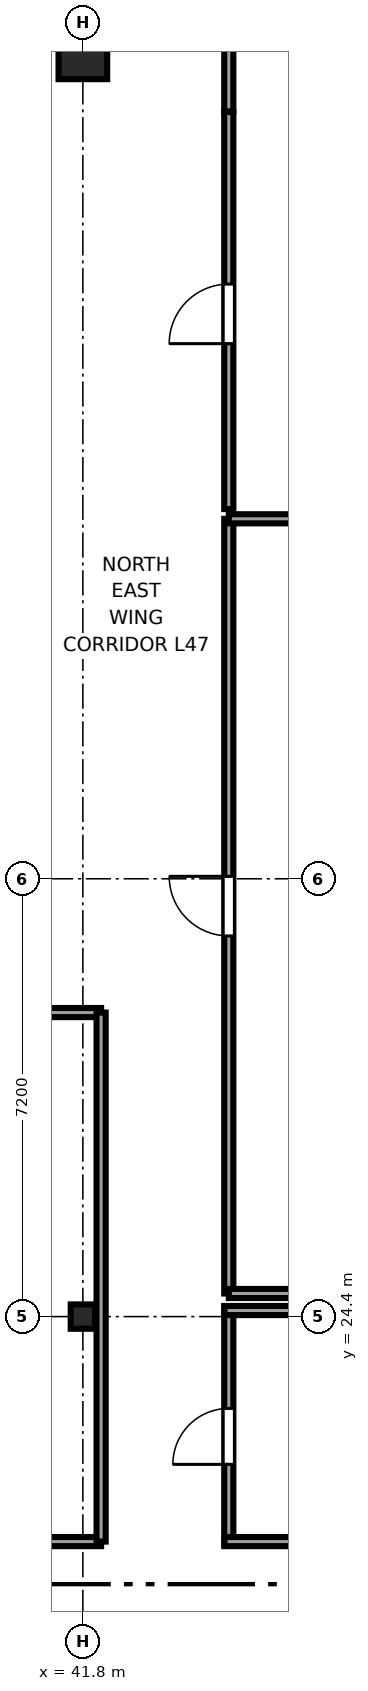
"""IFC4 building model, lengths in metres.
Left out: names, types, materials, properties, quantities, classifications, styles, units other than length and angle.
Written with IfcOpenShell. Run it as: python <this file> out.ifc"""

import sys

from ifc_helpers import new_model, si_unit, direction, frame, frame_2d, origin, origin_2d, place, context, subcontext, project, spatial, rectangle, i_section, extrude, source, transform, mapped, element, fill, save


model = new_model("IFC4")
c1 = context("Model", 3, precision=1e-05, world=origin(), true_north=direction((0.0, 1.0)))
c2 = subcontext(c1, "Body", "Model", "MODEL_VIEW")
j1 = project(units=[si_unit("LENGTHUNIT", "METRE"), si_unit("PLANEANGLEUNIT", "RADIAN")], contexts=[c1])
p1 = place(None, origin())
s1 = spatial("IfcSite", under=j1, at=p1, CompositionType="ELEMENT")
p2 = place(p1, origin())
s2 = spatial("IfcBuilding", under=s1, at=p2, CompositionType="ELEMENT")
p3 = place(p2, frame((0.0, 0.0, 179.0)))
s3 = spatial("IfcBuildingStorey", under=s2, at=p3, CompositionType="ELEMENT", Elevation=179.0)
m1 = source(origin(), c2, "Body", "SweptSolid", [
    extrude(i_section(OverallWidth=0.4, OverallDepth=0.4, WebThickness=0.02, FlangeThickness=0.035, at=origin_2d()), origin(), (0.0, 0.0, 1.0), 3.55),
])
p4 = place(p3, frame((41.8, 24.4, 0.0), z_axis=(0.0, 0.0, 1.0), x_axis=(1.0, 0.0, 0.0)))
e1 = element("IfcColumn", 1, at=p4, inside=s3, PredefinedType="COLUMN", context=c2, shape_type="MappedRepresentation", body=[
    mapped(m1, transform((0.0, 0.0, 0.0), x_axis=(1.0, 0.0, 0.0), y_axis=(0.0, 1.0, 0.0), z_axis=(0.0, 0.0, 1.0), scale=1.0)),
])
m2 = source(origin(), c2, "Body", "SweptSolid", [
    extrude(rectangle(XDim=0.8, YDim=0.8, at=origin_2d()), origin(), (0.0, 0.0, 1.0), 3.55),
])
p5 = place(p3, frame((41.8, 45.15, 0.0), z_axis=(0.0, 0.0, 1.0), x_axis=(1.0, 0.0, 0.0)))
e2 = element("IfcColumn", 2, at=p5, inside=s3, PredefinedType="COLUMN", context=c2, shape_type="MappedRepresentation", body=[
    mapped(m2, transform((0.0, 0.0, 0.0), x_axis=(1.0, 0.0, 0.0), y_axis=(0.0, 1.0, 0.0), z_axis=(0.0, 0.0, 1.0), scale=1.0)),
])
p6 = place(p3, frame((44.2, 20.63, 0.0), z_axis=(0.0, 0.0, 1.0), x_axis=(0.0, 1.0, 0.0)))
e3 = element("IfcWall", 3, at=p6, inside=s3, PredefinedType="PARTITIONING", context=c2, shape_type="SweptSolid", body=[
    extrude(rectangle(XDim=3.94, YDim=0.15, at=frame_2d((1.97, 0.0))), origin(), (0.0, 0.0, 1.0), 3.25),
])
p7 = place(p6, frame((1.34, 0.0, 0.0)))
e4 = element("IfcOpeningElement", 4, at=p7, cuts=e3, PredefinedType="OPENING", context=c2, shape_type="SweptSolid", body=[
    extrude(rectangle(XDim=0.92, YDim=2.01, at=frame_2d((0.46, 1.005))), frame((0.0, 0.085, 0.0), z_axis=(0.0, -1.0, 0.0), x_axis=(1.0, 0.0, 0.0)), (0.0, 0.0, 1.0), 0.17),
])
p8 = place(p3, frame((44.13, 20.7, 0.0), z_axis=(0.0, 0.0, 1.0), x_axis=(1.0, 0.0, 0.0)))
e5 = element("IfcWall", 5, at=p8, inside=s3, PredefinedType="PARTITIONING", context=c2, shape_type="SweptSolid", body=[
    extrude(rectangle(XDim=4.54, YDim=0.15, at=frame_2d((2.27, 0.0))), origin(), (0.0, 0.0, 1.0), 3.25),
])
p9 = place(p3, frame((44.13, 24.5, 0.0), z_axis=(0.0, 0.0, 1.0), x_axis=(1.0, 0.0, 0.0)))
e6 = element("IfcWall", 6, at=p9, inside=s3, PredefinedType="PARTITIONING", context=c2, shape_type="SweptSolid", body=[
    extrude(rectangle(XDim=4.54, YDim=0.15, at=frame_2d((2.27, 0.0))), origin(), (0.0, 0.0, 1.0), 2.638),
])
p10 = place(p3, frame((44.2, 24.78, 0.0), z_axis=(0.0, 0.0, 1.0), x_axis=(0.0, 1.0, 0.0)))
e7 = element("IfcWall", 7, at=p10, inside=s3, PredefinedType="PARTITIONING", context=c2, shape_type="SweptSolid", body=[
    extrude(rectangle(XDim=12.74, YDim=0.15, at=frame_2d((6.37, 0.0))), origin(), (0.0, 0.0, 1.0), 3.25),
])
p11 = place(p10, frame((5.88, 0.0, 0.0)))
e8 = element("IfcOpeningElement", 8, at=p11, cuts=e7, PredefinedType="OPENING", context=c2, shape_type="SweptSolid", body=[
    extrude(rectangle(XDim=0.98, YDim=2.12, at=frame_2d((0.49, 1.06))), frame((0.0, 0.085, 0.0), z_axis=(0.0, -1.0, 0.0), x_axis=(1.0, 0.0, 0.0)), (0.0, 0.0, 1.0), 0.17),
])
p12 = place(p3, frame((44.2, 24.78, 0.0), z_axis=(0.0, 0.0, 1.0), x_axis=(1.0, 0.0, 0.0)))
e9 = element("IfcWall", 9, at=p12, inside=s3, PredefinedType="PARTITIONING", context=c2, shape_type="SweptSolid", body=[
    extrude(rectangle(XDim=9.795, YDim=0.15, at=frame_2d((4.897, 0.0))), origin(), (0.0, 0.0, 1.0), 3.25),
])
p13 = place(p3, frame((44.2, 37.52, 0.0), z_axis=(0.0, 0.0, 1.0), x_axis=(1.0, 0.0, 0.0)))
e10 = element("IfcWall", 10, at=p13, inside=s3, PredefinedType="PARTITIONING", context=c2, shape_type="SweptSolid", body=[
    extrude(rectangle(XDim=7.43, YDim=0.15, at=frame_2d((3.715, 0.0))), origin(), (0.0, 0.0, 1.0), 3.25),
])
p14 = place(p3, frame((44.2, 37.68, 0.0), z_axis=(0.0, 0.0, 1.0), x_axis=(0.0, 1.0, 0.0)))
e11 = element("IfcWall", 11, at=p14, inside=s3, PredefinedType="PARTITIONING", context=c2, shape_type="SweptSolid", body=[
    extrude(rectangle(XDim=6.53, YDim=0.15, at=frame_2d((3.265, 0.0))), origin(), (0.0, 0.0, 1.0), 3.25),
])
p15 = place(p14, frame((2.72, 0.0, 0.0)))
e12 = element("IfcOpeningElement", 12, at=p15, cuts=e11, PredefinedType="OPENING", context=c2, shape_type="SweptSolid", body=[
    extrude(rectangle(XDim=0.98, YDim=2.12, at=frame_2d((0.49, 1.06))), frame((0.0, 0.085, 0.0), z_axis=(0.0, -1.0, 0.0), x_axis=(1.0, 0.0, 0.0)), (0.0, 0.0, 1.0), 0.17),
])
p16 = place(p3, frame((44.2, 44.22, 0.0), z_axis=(0.0, 0.0, 1.0), x_axis=(0.0, 1.0, 0.0)))
e13 = element("IfcWall", 13, at=p16, inside=s3, PredefinedType="PARTITIONING", context=c2, shape_type="SweptSolid", body=[
    extrude(rectangle(XDim=1.375, YDim=0.15, at=frame_2d((0.688, 0.0))), origin(), (0.0, 0.0, 1.0), 3.25),
])
p17 = place(p3, frame((34.6, 20.7, 0.0), z_axis=(0.0, 0.0, 1.0), x_axis=(1.0, 0.0, 0.0)))
e14 = element("IfcWall", 14, at=p17, inside=s3, PredefinedType="PARTITIONING", context=c2, shape_type="SweptSolid", body=[
    extrude(rectangle(XDim=7.5, YDim=0.15, at=frame_2d((3.75, 0.0))), origin(), (0.0, 0.0, 1.0), 3.25),
])
p18 = place(p17, frame((2.925, 0.0, 0.0)))
e15 = element("IfcOpeningElement", 15, at=p18, cuts=e14, PredefinedType="OPENING", context=c2, shape_type="SweptSolid", body=[
    extrude(rectangle(XDim=1.65, YDim=2.15, at=frame_2d((0.825, 1.075))), frame((0.0, 0.085, 0.0), z_axis=(0.0, -1.0, 0.0), x_axis=(1.0, 0.0, 0.0)), (0.0, 0.0, 1.0), 0.17),
])
p19 = place(p3, frame((34.6, 29.4, 0.0), z_axis=(0.0, 0.0, 1.0), x_axis=(1.0, 0.0, 0.0)))
e16 = element("IfcWall", 16, at=p19, inside=s3, PredefinedType="PARTITIONING", context=c2, shape_type="SweptSolid", body=[
    extrude(rectangle(XDim=7.5, YDim=0.15, at=frame_2d((3.75, 0.0))), origin(), (0.0, 0.0, 1.0), 3.25),
])
p20 = place(p3, frame((42.1, 20.7, 0.0), z_axis=(0.0, 0.0, 1.0), x_axis=(0.0, 1.0, 0.0)))
e17 = element("IfcWall", 17, at=p20, inside=s3, PredefinedType="PARTITIONING", context=c2, shape_type="SweptSolid", body=[
    extrude(rectangle(XDim=8.7, YDim=0.15, at=frame_2d((4.35, 0.0))), origin(), (0.0, 0.0, 1.0), 2.04),
])
m3 = source(origin(), c2, "Body", "SweptSolid", [
    extrude(rectangle(XDim=0.92, YDim=2.01, at=frame_2d((0.46, 1.005))), frame((0.0, 0.025, 0.0), z_axis=(0.0, -1.0, 0.0), x_axis=(1.0, 0.0, 0.0)), (0.0, 0.0, 1.0), 0.05),
])
p21 = place(p7, origin())
e18 = element("IfcDoor", 18, at=p21, inside=s3, OperationType="SINGLE_SWING_LEFT", PredefinedType="DOOR", context=c2, shape_type="MappedRepresentation", body=[
    mapped(m3, transform((0.0, 0.0, 0.0), x_axis=(1.0, 0.0, 0.0), y_axis=(0.0, 1.0, 0.0), z_axis=(0.0, 0.0, 1.0), scale=1.0)),
])
fill(e4, e18)
m4 = source(origin(), c2, "Body", "SweptSolid", [
    extrude(rectangle(XDim=0.98, YDim=2.12, at=frame_2d((0.49, 1.06))), frame((0.0, 0.025, 0.0), z_axis=(0.0, -1.0, 0.0), x_axis=(1.0, 0.0, 0.0)), (0.0, 0.0, 1.0), 0.05),
])
p22 = place(p11, origin())
e19 = element("IfcDoor", 19, at=p22, inside=s3, OperationType="SINGLE_SWING_RIGHT", PredefinedType="DOOR", context=c2, shape_type="MappedRepresentation", body=[
    mapped(m4, transform((0.0, 0.0, 0.0), x_axis=(1.0, 0.0, 0.0), y_axis=(0.0, 1.0, 0.0), z_axis=(0.0, 0.0, 1.0), scale=1.0)),
])
fill(e8, e19)
p23 = place(p15, origin())
e20 = element("IfcDoor", 20, at=p23, inside=s3, OperationType="SINGLE_SWING_LEFT", PredefinedType="DOOR", context=c2, shape_type="MappedRepresentation", body=[
    mapped(m4, transform((0.0, 0.0, 0.0), x_axis=(1.0, 0.0, 0.0), y_axis=(0.0, 1.0, 0.0), z_axis=(0.0, 0.0, 1.0), scale=1.0)),
])
fill(e12, e20)
save(model, sys.argv[1])
